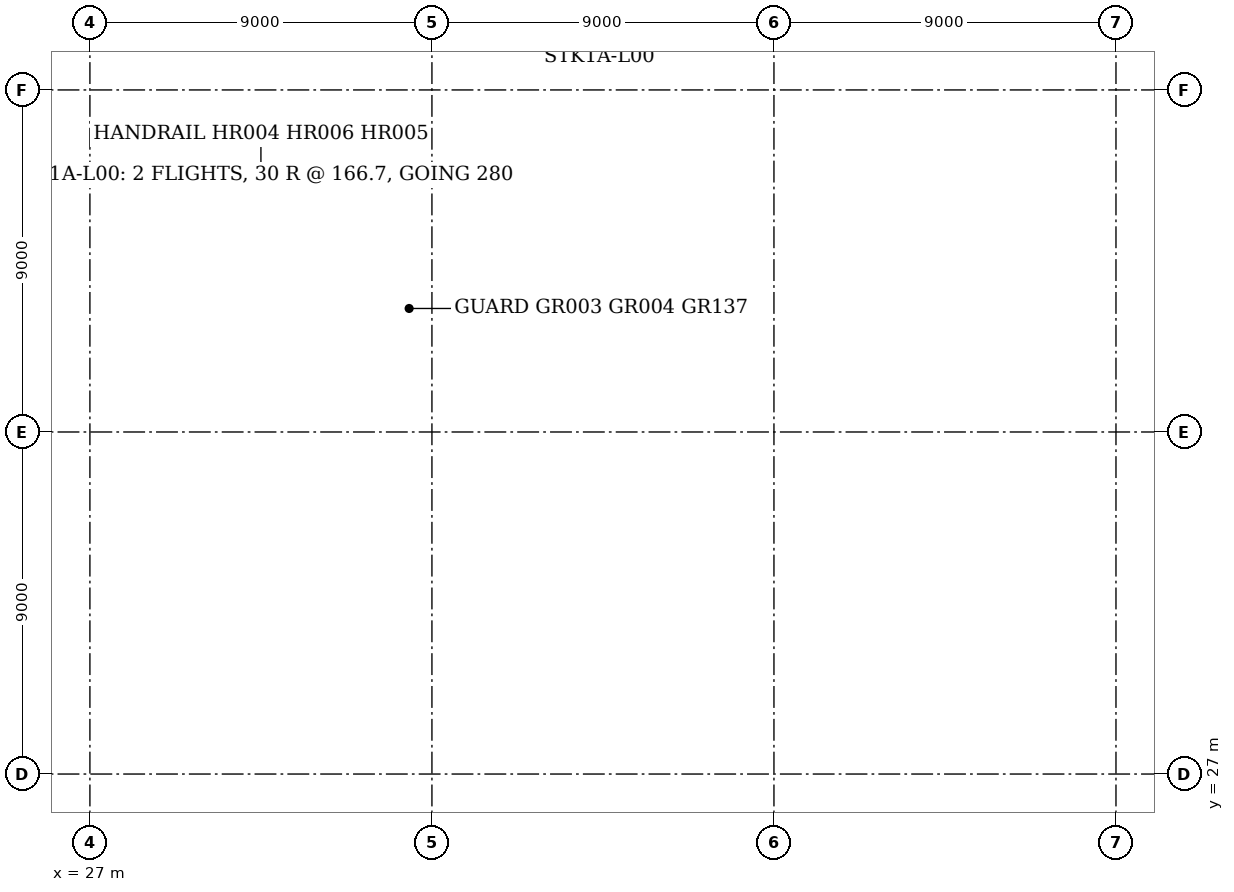
"""IFC4 building model, lengths in metres.
Left out: names, types, materials, properties, quantities, classifications, styles, units other than length and angle.
Written with IfcOpenShell. Run it as: python <this file> out.ifc"""

import sys

from ifc_helpers import new_model, si_unit, direction, frame, frame_2d, origin, origin_2d, place, context, subcontext, project, spatial, rectangle, hollow_rectangle, i_section, extrude, element, fill, save


model = new_model("IFC4")
c1 = context("Model", 3, precision=1e-05, world=origin(), true_north=direction((0.0, 1.0)))
c2 = subcontext(c1, "Body", "Model", "MODEL_VIEW")
j1 = project(units=[si_unit("LENGTHUNIT", "METRE"), si_unit("PLANEANGLEUNIT", "RADIAN")], contexts=[c1])
p1 = place(None, origin())
s1 = spatial("IfcSite", under=j1, at=p1, CompositionType="ELEMENT")
p2 = place(p1, origin())
s2 = spatial("IfcBuilding", under=s1, at=p2, CompositionType="ELEMENT")
p3 = place(p2, origin())
s3 = spatial("IfcBuildingStorey", under=s2, at=p3, CompositionType="ELEMENT", Elevation=0.0)
p4 = place(p3, frame((27.0, 27.0, 0.0), z_axis=(0.0, 0.0, 1.0), x_axis=(1.0, 0.0, 0.0)))
e1 = element("IfcColumn", 1, at=p4, inside=s3, PredefinedType="COLUMN", context=c2, shape_type="SweptSolid", body=[
    extrude(hollow_rectangle(XDim=0.3, YDim=0.3, WallThickness=0.016, InnerFilletRadius=0.024, OuterFilletRadius=0.04, at=origin_2d()), origin(), (0.0, 0.0, 1.0), 5.0),
])
p5 = place(p3, frame((36.0, 27.0, 0.0), z_axis=(0.0, 0.0, 1.0), x_axis=(1.0, 0.0, 0.0)))
e2 = element("IfcColumn", 2, at=p5, inside=s3, PredefinedType="COLUMN", context=c2, shape_type="SweptSolid", body=[
    extrude(i_section(OverallWidth=0.5, OverallDepth=0.48, WebThickness=0.04, FlangeThickness=0.04, at=origin_2d()), origin(), (0.0, 0.0, 1.0), 5.0),
])
p6 = place(p3, frame((45.0, 27.0, 0.0), z_axis=(0.0, 0.0, 1.0), x_axis=(1.0, 0.0, 0.0)))
e3 = element("IfcColumn", 3, at=p6, inside=s3, PredefinedType="COLUMN", context=c2, shape_type="SweptSolid", body=[
    extrude(i_section(OverallWidth=0.309, OverallDepth=0.321, WebThickness=0.014, FlangeThickness=0.022, FilletRadius=0.017, at=origin_2d()), origin(), (0.0, 0.0, 1.0), 5.0),
])
p7 = place(p3, frame((54.0, 27.0, 0.0), z_axis=(0.0, 0.0, 1.0), x_axis=(1.0, 0.0, 0.0)))
e4 = element("IfcColumn", 4, at=p7, inside=s3, PredefinedType="COLUMN", context=c2, shape_type="SweptSolid", body=[
    extrude(i_section(OverallWidth=0.5, OverallDepth=0.48, WebThickness=0.04, FlangeThickness=0.04, at=origin_2d()), origin(), (0.0, 0.0, 1.0), 5.0),
])
p8 = place(p3, frame((27.0, 36.0, 0.0), z_axis=(0.0, 0.0, 1.0), x_axis=(1.0, 0.0, 0.0)))
e5 = element("IfcColumn", 5, at=p8, inside=s3, PredefinedType="COLUMN", context=c2, shape_type="SweptSolid", body=[
    extrude(hollow_rectangle(XDim=0.3, YDim=0.3, WallThickness=0.016, InnerFilletRadius=0.024, OuterFilletRadius=0.04, at=origin_2d()), origin(), (0.0, 0.0, 1.0), 5.0),
])
p9 = place(p3, frame((36.0, 36.0, 0.0), z_axis=(0.0, 0.0, 1.0), x_axis=(1.0, 0.0, 0.0)))
e6 = element("IfcColumn", 6, at=p9, inside=s3, PredefinedType="COLUMN", context=c2, shape_type="SweptSolid", body=[
    extrude(i_section(OverallWidth=0.5, OverallDepth=0.48, WebThickness=0.04, FlangeThickness=0.04, at=origin_2d()), origin(), (0.0, 0.0, 1.0), 5.0),
])
p10 = place(p3, frame((45.0, 36.0, 0.0), z_axis=(0.0, 0.0, 1.0), x_axis=(1.0, 0.0, 0.0)))
e7 = element("IfcColumn", 7, at=p10, inside=s3, PredefinedType="COLUMN", context=c2, shape_type="SweptSolid", body=[
    extrude(i_section(OverallWidth=0.309, OverallDepth=0.321, WebThickness=0.014, FlangeThickness=0.022, FilletRadius=0.017, at=origin_2d()), origin(), (0.0, 0.0, 1.0), 5.0),
])
p11 = place(p3, frame((54.0, 36.0, 0.0), z_axis=(0.0, 0.0, 1.0), x_axis=(1.0, 0.0, 0.0)))
e8 = element("IfcColumn", 8, at=p11, inside=s3, PredefinedType="COLUMN", context=c2, shape_type="SweptSolid", body=[
    extrude(i_section(OverallWidth=0.5, OverallDepth=0.48, WebThickness=0.04, FlangeThickness=0.04, at=origin_2d()), origin(), (0.0, 0.0, 1.0), 5.0),
])
p12 = place(p3, frame((45.0, 45.0, 0.0), z_axis=(0.0, 0.0, 1.0), x_axis=(1.0, 0.0, 0.0)))
e9 = element("IfcColumn", 9, at=p12, inside=s3, PredefinedType="COLUMN", context=c2, shape_type="SweptSolid", body=[
    extrude(hollow_rectangle(XDim=0.3, YDim=0.3, WallThickness=0.016, InnerFilletRadius=0.024, OuterFilletRadius=0.04, at=origin_2d()), origin(), (0.0, 0.0, 1.0), 5.0),
])
p13 = place(p3, frame((54.0, 45.0, 0.0), z_axis=(0.0, 0.0, 1.0), x_axis=(1.0, 0.0, 0.0)))
e10 = element("IfcColumn", 10, at=p13, inside=s3, PredefinedType="COLUMN", context=c2, shape_type="SweptSolid", body=[
    extrude(i_section(OverallWidth=0.5, OverallDepth=0.48, WebThickness=0.04, FlangeThickness=0.04, at=origin_2d()), origin(), (0.0, 0.0, 1.0), 5.0),
])
p14 = place(p3, frame((26.756, 45.0, 0.0), z_axis=(0.0, 0.0, 1.0), x_axis=(1.0, 0.0, 0.0)))
e11 = element("IfcColumn", 11, at=p14, inside=s3, PredefinedType="COLUMN", context=c2, shape_type="SweptSolid", body=[
    extrude(i_section(OverallWidth=0.311, OverallDepth=0.327, WebThickness=0.016, FlangeThickness=0.025, FilletRadius=0.017, at=origin_2d()), origin(), (0.0, 0.0, 1.0), 5.0),
])
p15 = place(p3, frame((54.25, 44.91, 0.0), z_axis=(0.0, 0.0, 1.0), x_axis=(1.0, 0.0, 0.0)))
e12 = element("IfcWall", 12, at=p15, inside=s3, PredefinedType="SOLIDWALL", context=c2, shape_type="SweptSolid", body=[
    extrude(rectangle(XDim=8.75, YDim=0.3, at=frame_2d((4.375, 0.0))), origin(), (0.0, 0.0, 1.0), 4.378),
])
p16 = place(p3, frame((36.0, 44.91, 0.0), z_axis=(0.0, 0.0, 1.0), x_axis=(1.0, 0.0, 0.0)))
e13 = element("IfcWall", 13, at=p16, inside=s3, PredefinedType="SOLIDWALL", context=c2, shape_type="SweptSolid", body=[
    extrude(rectangle(XDim=8.85, YDim=0.3, at=frame_2d((4.425, 0.0))), origin(), (0.0, 0.0, 1.0), 4.378),
])
for number, where, z_axis, x_axis in (
    (14, (27.09, 36.15, 0.0), (0.0, 0.0, 1.0), (0.0, 1.0, 0.0)),
    (15, (27.09, 22.5, 0.0), (0.0, 0.0, 1.0), (0.0, 1.0, 0.0)),
):
    element("IfcWall", number, at=place(p3, frame(where, z_axis=z_axis, x_axis=x_axis)), inside=s3, PredefinedType="SOLIDWALL", context=c2, shape_type="SweptSolid", body=[
        extrude(rectangle(XDim=4.35, YDim=0.3, at=frame_2d((2.175, 0.0))), origin(), (0.0, 0.0, 1.0), 4.378),
    ])
p17 = place(p3, frame((47.95, 44.85, 0.0), z_axis=(0.0, 0.0, 1.0), x_axis=(1.0, 0.0, 0.0)))
e16 = element("IfcWall", 16, at=p17, inside=s3, PredefinedType="SOLIDWALL", context=c2, shape_type="SweptSolid", body=[
    extrude(rectangle(XDim=3.0, YDim=0.2, at=frame_2d((1.5, 0.0))), origin(), (0.0, 0.0, 1.0), 4.835),
])
p18 = place(p17, frame((0.3, 0.0, 0.0)))
e17 = element("IfcOpeningElement", 17, at=p18, cuts=e16, PredefinedType="OPENING", context=c2, shape_type="SweptSolid", body=[
    extrude(rectangle(XDim=2.4, YDim=2.4, at=frame_2d((1.2, 1.2))), frame((0.0, 0.11, 0.0), z_axis=(0.0, -1.0, 0.0), x_axis=(1.0, 0.0, 0.0)), (0.0, 0.0, 1.0), 0.22),
])
p19 = place(p3, frame((27.15, 28.65, 0.0), z_axis=(0.0, 0.0, 1.0), x_axis=(0.0, 1.0, 0.0)))
e18 = element("IfcWall", 18, at=p19, inside=s3, PredefinedType="SOLIDWALL", context=c2, shape_type="SweptSolid", body=[
    extrude(rectangle(XDim=5.7, YDim=0.2, at=frame_2d((2.85, 0.0))), origin(), (0.0, 0.0, 1.0), 4.835),
])
p20 = place(p19, frame((3.0, 0.0, 0.0)))
e19 = element("IfcOpeningElement", 19, at=p20, cuts=e18, PredefinedType="OPENING", context=c2, shape_type="SweptSolid", body=[
    extrude(rectangle(XDim=2.4, YDim=2.4, at=frame_2d((1.2, 1.2))), frame((0.0, 0.11, 0.0), z_axis=(0.0, -1.0, 0.0), x_axis=(1.0, 0.0, 0.0)), (0.0, 0.0, 1.0), 0.22),
])
p21 = place(p19, frame((0.3, 0.0, 0.0)))
e20 = element("IfcOpeningElement", 20, at=p21, cuts=e18, PredefinedType="OPENING", context=c2, shape_type="SweptSolid", body=[
    extrude(rectangle(XDim=2.4, YDim=2.4, at=frame_2d((1.2, 1.2))), frame((0.0, 0.11, 0.0), z_axis=(0.0, -1.0, 0.0), x_axis=(1.0, 0.0, 0.0)), (0.0, 0.0, 1.0), 0.22),
])
p22 = place(p3, frame((35.875, 45.2, -0.7), z_axis=(0.0, 0.0, 1.0), x_axis=(0.0, 1.0, 0.0)))
e21 = element("IfcWall", 21, at=p22, inside=s3, PredefinedType="SOLIDWALL", context=c2, shape_type="SweptSolid", body=[
    extrude(rectangle(XDim=5.55, YDim=0.25, at=frame_2d((2.775, 0.0))), origin(), (0.0, 0.0, 1.0), 0.7),
])
p23 = place(p3, frame((27.0, 40.65, 0.0), z_axis=(0.0, 0.0, 1.0), x_axis=(1.0, 0.0, 0.0)))
e22 = element("IfcWall", 22, at=p23, inside=s3, PredefinedType="SOLIDWALL", context=c2, shape_type="SweptSolid", body=[
    extrude(rectangle(XDim=9.0, YDim=0.3, at=frame_2d((4.5, 0.0))), origin(), (0.0, 0.0, 1.0), 5.0),
])
p24 = place(p3, frame((35.85, 40.8, 0.0), z_axis=(0.0, 0.0, 1.0), x_axis=(0.0, 1.0, 0.0)))
e23 = element("IfcWall", 23, at=p24, inside=s3, PredefinedType="SOLIDWALL", context=c2, shape_type="SweptSolid", body=[
    extrude(rectangle(XDim=3.9, YDim=0.3, at=frame_2d((1.95, 0.0))), origin(), (0.0, 0.0, 1.0), 5.0),
])
p25 = place(p24, frame((1.05, 0.0, 0.0)))
e24 = element("IfcOpeningElement", 24, at=p25, cuts=e23, PredefinedType="OPENING", context=c2, shape_type="SweptSolid", body=[
    extrude(rectangle(XDim=1.8, YDim=2.1, at=frame_2d((0.9, 1.05))), frame((0.0, 0.16, 0.0), z_axis=(0.0, -1.0, 0.0), x_axis=(1.0, 0.0, 0.0)), (0.0, 0.0, 1.0), 0.32),
])
p26 = place(p3, frame((27.0, 44.85, 0.0), z_axis=(0.0, 0.0, 1.0), x_axis=(1.0, 0.0, 0.0)))
e25 = element("IfcWall", 25, at=p26, inside=s3, PredefinedType="SOLIDWALL", context=c2, shape_type="SweptSolid", body=[
    extrude(rectangle(XDim=9.0, YDim=0.3, at=frame_2d((4.5, 0.0))), origin(), (0.0, 0.0, 1.0), 5.0),
])
p27 = place(p26, frame((3.55, 0.0, 0.0)))
e26 = element("IfcOpeningElement", 26, at=p27, cuts=e25, PredefinedType="OPENING", context=c2, shape_type="SweptSolid", body=[
    extrude(rectangle(XDim=1.8, YDim=2.1, at=frame_2d((0.9, 1.05))), frame((0.0, 0.16, 0.0), z_axis=(0.0, -1.0, 0.0), x_axis=(1.0, 0.0, 0.0)), (0.0, 0.0, 1.0), 0.32),
])
p28 = place(p3, frame((27.15, 40.8, 0.0), z_axis=(0.0, 0.0, 1.0), x_axis=(0.0, 1.0, 0.0)))
e27 = element("IfcWall", 27, at=p28, inside=s3, PredefinedType="SOLIDWALL", context=c2, shape_type="SweptSolid", body=[
    extrude(rectangle(XDim=3.9, YDim=0.3, at=frame_2d((1.95, 0.0))), origin(), (0.0, 0.0, 1.0), 5.0),
])
p29 = place(p3, frame((39.048, 27.1, 0.0), z_axis=(0.0, 0.0, 1.0), x_axis=(1.0, 0.0, 0.0)))
e28 = element("IfcWall", 28, at=p29, inside=s3, PredefinedType="PARTITIONING", context=c2, shape_type="SweptSolid", body=[
    extrude(rectangle(XDim=3.0, YDim=0.2, at=frame_2d((1.5, 0.0))), origin(), (0.0, 0.0, 1.0), 4.228),
])
p30 = place(p29, frame((0.55, 0.0, 0.0)))
e29 = element("IfcOpeningElement", 29, at=p30, cuts=e28, PredefinedType="OPENING", context=c2, shape_type="SweptSolid", body=[
    extrude(rectangle(XDim=1.8, YDim=2.1, at=frame_2d((0.9, 1.05))), frame((0.0, 0.11, 0.0), z_axis=(0.0, -1.0, 0.0), x_axis=(1.0, 0.0, 0.0)), (0.0, 0.0, 1.0), 0.22),
])
p31 = place(p3, frame((47.952, 27.1, 0.0), z_axis=(0.0, 0.0, 1.0), x_axis=(1.0, 0.0, 0.0)))
e30 = element("IfcWall", 30, at=p31, inside=s3, PredefinedType="PARTITIONING", context=c2, shape_type="SweptSolid", body=[
    extrude(rectangle(XDim=3.0, YDim=0.2, at=frame_2d((1.5, 0.0))), origin(), (0.0, 0.0, 1.0), 4.228),
])
p32 = place(p3, frame((36.1, 30.0, 0.0), z_axis=(0.0, 0.0, 1.0), x_axis=(0.0, 1.0, 0.0)))
e31 = element("IfcWall", 31, at=p32, inside=s3, PredefinedType="PARTITIONING", context=c2, shape_type="SweptSolid", body=[
    extrude(rectangle(XDim=3.0, YDim=0.2, at=frame_2d((1.5, 0.0))), origin(), (0.0, 0.0, 1.0), 4.228),
])
p33 = place(p32, frame((0.55, 0.0, 0.0)))
e32 = element("IfcOpeningElement", 32, at=p33, cuts=e31, PredefinedType="OPENING", context=c2, shape_type="SweptSolid", body=[
    extrude(rectangle(XDim=1.8, YDim=2.1, at=frame_2d((0.9, 1.05))), frame((0.0, 0.11, 0.0), z_axis=(0.0, -1.0, 0.0), x_axis=(1.0, 0.0, 0.0)), (0.0, 0.0, 1.0), 0.22),
])
p34 = place(p3, frame((39.048, 35.9, 0.0), z_axis=(0.0, 0.0, 1.0), x_axis=(1.0, 0.0, 0.0)))
e33 = element("IfcWall", 33, at=p34, inside=s3, PredefinedType="PARTITIONING", context=c2, shape_type="SweptSolid", body=[
    extrude(rectangle(XDim=3.0, YDim=0.2, at=frame_2d((1.5, 0.0))), origin(), (0.0, 0.0, 1.0), 4.228),
])
p35 = place(p34, frame((0.55, 0.0, 0.0)))
e34 = element("IfcOpeningElement", 34, at=p35, cuts=e33, PredefinedType="OPENING", context=c2, shape_type="SweptSolid", body=[
    extrude(rectangle(XDim=1.8, YDim=2.4, at=frame_2d((0.9, 1.2))), frame((0.0, 0.11, 0.0), z_axis=(0.0, -1.0, 0.0), x_axis=(1.0, 0.0, 0.0)), (0.0, 0.0, 1.0), 0.22),
])
p36 = place(p3, frame((47.952, 35.9, 0.0), z_axis=(0.0, 0.0, 1.0), x_axis=(1.0, 0.0, 0.0)))
e35 = element("IfcWall", 35, at=p36, inside=s3, PredefinedType="PARTITIONING", context=c2, shape_type="SweptSolid", body=[
    extrude(rectangle(XDim=3.0, YDim=0.2, at=frame_2d((1.5, 0.0))), origin(), (0.0, 0.0, 1.0), 4.228),
])
p37 = place(p3, frame((54.25, 35.9, 0.0), z_axis=(0.0, 0.0, 1.0), x_axis=(1.0, 0.0, 0.0)))
e36 = element("IfcWall", 36, at=p37, inside=s3, PredefinedType="PARTITIONING", context=c2, shape_type="SweptSolid", body=[
    extrude(rectangle(XDim=8.594, YDim=0.2, at=frame_2d((4.297, 0.0))), origin(), (0.0, 0.0, 1.0), 4.228),
])
p38 = place(p3, frame((54.0, 36.24, 0.0), z_axis=(0.0, 0.0, 1.0), x_axis=(0.0, 1.0, 0.0)))
e37 = element("IfcWall", 37, at=p38, inside=s3, PredefinedType="PARTITIONING", context=c2, shape_type="SweptSolid", body=[
    extrude(rectangle(XDim=8.52, YDim=0.2, at=frame_2d((4.26, 0.0))), origin(), (0.0, 0.0, 1.0), 4.302),
])
p39 = place(p38, frame((3.35, 0.0, 0.0)))
e38 = element("IfcOpeningElement", 38, at=p39, cuts=e37, PredefinedType="OPENING", context=c2, shape_type="SweptSolid", body=[
    extrude(rectangle(XDim=1.8, YDim=2.1, at=frame_2d((0.9, 1.05))), frame((0.0, 0.11, 0.0), z_axis=(0.0, -1.0, 0.0), x_axis=(1.0, 0.0, 0.0)), (0.0, 0.0, 1.0), 0.22),
])
p40 = place(p18, origin())
e39 = element("IfcDoor", 39, at=p40, inside=s3, OperationType="DOUBLE_DOOR_SINGLE_SWING", PredefinedType="DOOR", context=c2, shape_type="SweptSolid", body=[
    extrude(rectangle(XDim=2.4, YDim=2.4, at=frame_2d((1.2, 1.2))), frame((0.0, 0.025, 0.0), z_axis=(0.0, -1.0, 0.0), x_axis=(1.0, 0.0, 0.0)), (0.0, 0.0, 1.0), 0.05),
])
fill(e17, e39)
p41 = place(p20, origin())
e40 = element("IfcDoor", 40, at=p41, inside=s3, OperationType="DOUBLE_DOOR_SINGLE_SWING", PredefinedType="DOOR", context=c2, shape_type="SweptSolid", body=[
    extrude(rectangle(XDim=2.4, YDim=2.4, at=frame_2d((1.2, 1.2))), frame((0.0, 0.025, 0.0), z_axis=(0.0, -1.0, 0.0), x_axis=(1.0, 0.0, 0.0)), (0.0, 0.0, 1.0), 0.05),
])
fill(e19, e40)
p42 = place(p21, origin())
e41 = element("IfcDoor", 41, at=p42, inside=s3, OperationType="DOUBLE_DOOR_SINGLE_SWING", PredefinedType="DOOR", context=c2, shape_type="SweptSolid", body=[
    extrude(rectangle(XDim=2.4, YDim=2.4, at=frame_2d((1.2, 1.2))), frame((0.0, 0.025, 0.0), z_axis=(0.0, -1.0, 0.0), x_axis=(1.0, 0.0, 0.0)), (0.0, 0.0, 1.0), 0.05),
])
fill(e20, e41)
p43 = place(p27, origin())
e42 = element("IfcDoor", 42, at=p43, inside=s3, OperationType="DOUBLE_DOOR_SINGLE_SWING", PredefinedType="DOOR", context=c2, shape_type="SweptSolid", body=[
    extrude(rectangle(XDim=1.8, YDim=2.1, at=frame_2d((0.9, 1.05))), frame((0.0, 0.025, 0.0), z_axis=(0.0, -1.0, 0.0), x_axis=(1.0, 0.0, 0.0)), (0.0, 0.0, 1.0), 0.05),
])
fill(e26, e42)
p44 = place(p25, origin())
e43 = element("IfcDoor", 43, at=p44, inside=s3, OperationType="DOUBLE_DOOR_SINGLE_SWING", PredefinedType="DOOR", context=c2, shape_type="SweptSolid", body=[
    extrude(rectangle(XDim=1.8, YDim=2.1, at=frame_2d((0.9, 1.05))), frame((0.0, 0.025, 0.0), z_axis=(0.0, -1.0, 0.0), x_axis=(1.0, 0.0, 0.0)), (0.0, 0.0, 1.0), 0.05),
])
fill(e24, e43)
p45 = place(p30, frame((1.8, 0.0, 0.0), z_axis=(0.0, 0.0, 1.0), x_axis=(-1.0, 0.0, 0.0)))
e44 = element("IfcDoor", 44, at=p45, inside=s3, OperationType="DOUBLE_DOOR_SINGLE_SWING", PredefinedType="DOOR", context=c2, shape_type="SweptSolid", body=[
    extrude(rectangle(XDim=1.8, YDim=2.1, at=frame_2d((0.9, 1.05))), frame((0.0, 0.025, 0.0), z_axis=(0.0, -1.0, 0.0), x_axis=(1.0, 0.0, 0.0)), (0.0, 0.0, 1.0), 0.05),
])
fill(e29, e44)
p46 = place(p33, frame((1.8, 0.0, 0.0), z_axis=(0.0, 0.0, 1.0), x_axis=(-1.0, 0.0, 0.0)))
e45 = element("IfcDoor", 45, at=p46, inside=s3, OperationType="DOUBLE_DOOR_SINGLE_SWING", PredefinedType="DOOR", context=c2, shape_type="SweptSolid", body=[
    extrude(rectangle(XDim=1.8, YDim=2.1, at=frame_2d((0.9, 1.05))), frame((0.0, 0.025, 0.0), z_axis=(0.0, -1.0, 0.0), x_axis=(1.0, 0.0, 0.0)), (0.0, 0.0, 1.0), 0.05),
])
fill(e32, e45)
p47 = place(p35, frame((1.8, 0.0, 0.0), z_axis=(0.0, 0.0, 1.0), x_axis=(-1.0, 0.0, 0.0)))
e46 = element("IfcDoor", 46, at=p47, inside=s3, OperationType="DOUBLE_DOOR_SINGLE_SWING", PredefinedType="DOOR", context=c2, shape_type="SweptSolid", body=[
    extrude(rectangle(XDim=1.8, YDim=2.4, at=frame_2d((0.9, 1.2))), frame((0.0, 0.025, 0.0), z_axis=(0.0, -1.0, 0.0), x_axis=(1.0, 0.0, 0.0)), (0.0, 0.0, 1.0), 0.05),
])
fill(e34, e46)
p48 = place(p39, frame((1.8, 0.0, 0.0), z_axis=(0.0, 0.0, 1.0), x_axis=(-1.0, 0.0, 0.0)))
e47 = element("IfcDoor", 47, at=p48, inside=s3, OperationType="DOUBLE_DOOR_SINGLE_SWING", PredefinedType="DOOR", context=c2, shape_type="SweptSolid", body=[
    extrude(rectangle(XDim=1.8, YDim=2.1, at=frame_2d((0.9, 1.05))), frame((0.0, 0.025, 0.0), z_axis=(0.0, -1.0, 0.0), x_axis=(1.0, 0.0, 0.0)), (0.0, 0.0, 1.0), 0.05),
])
fill(e38, e47)
save(model, sys.argv[1])
